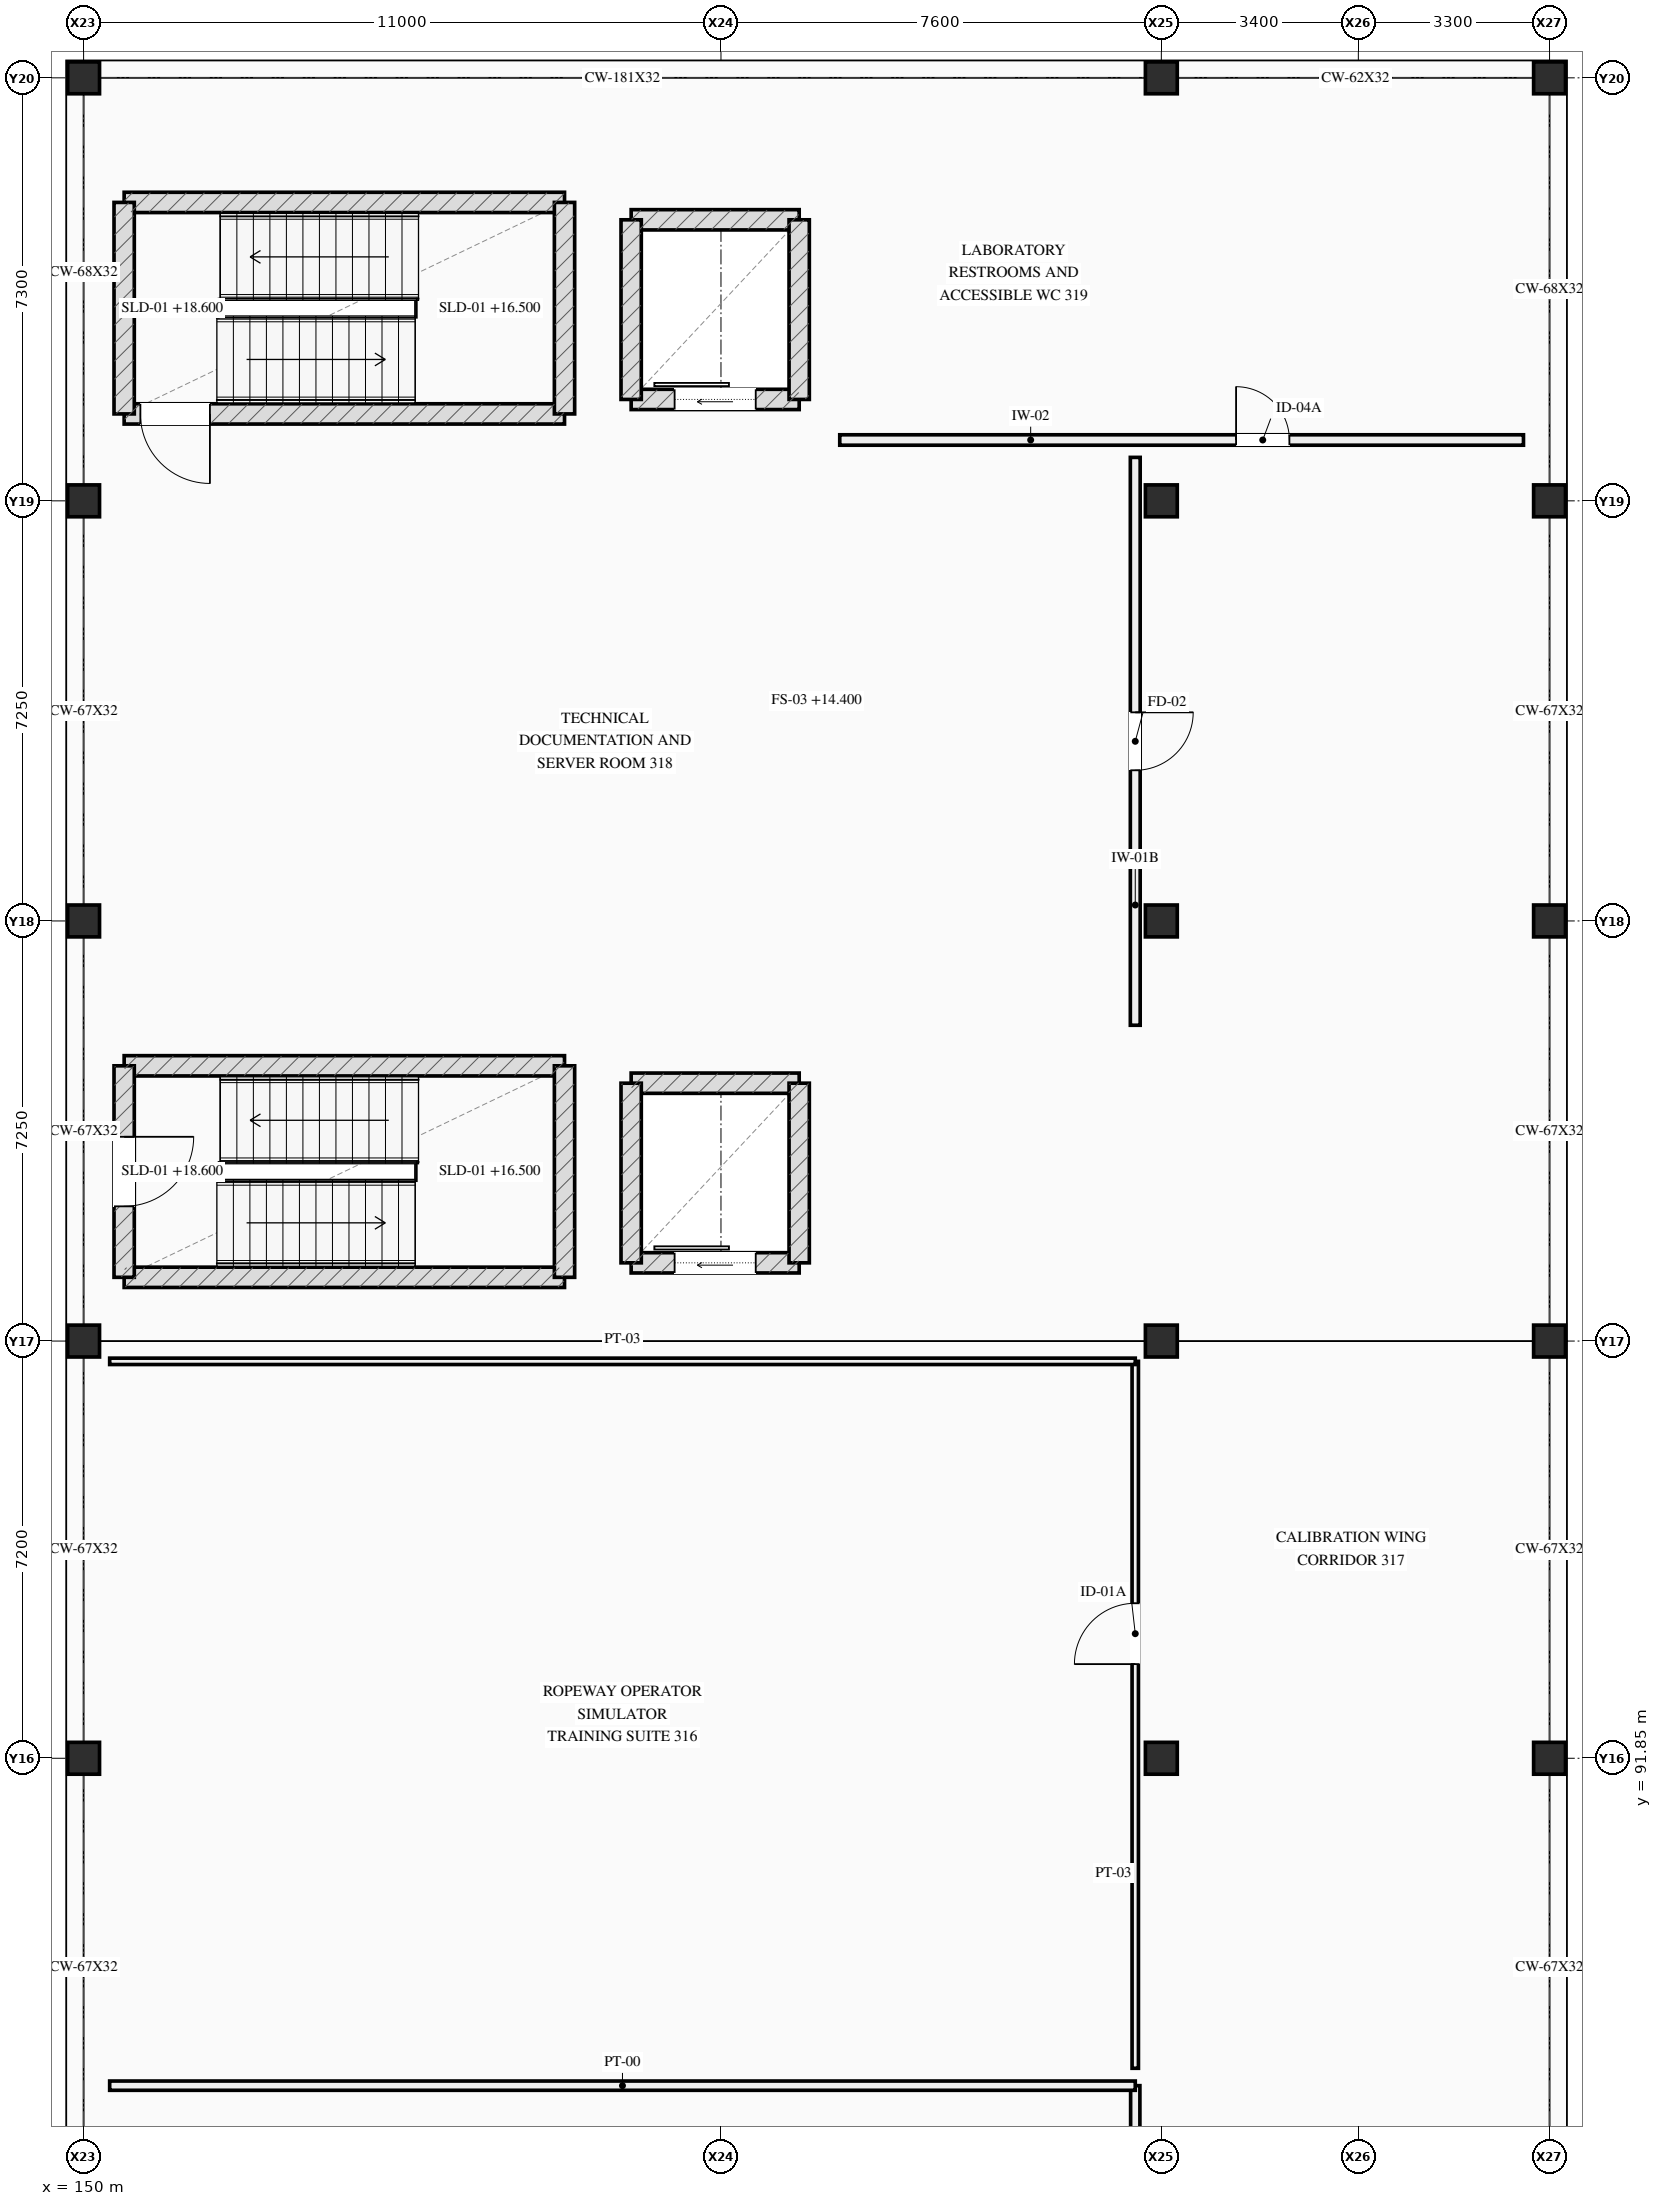
"""IFC4 building model, lengths in metres.
Left out: names, types, materials, properties, quantities, classifications, styles, units other than length and angle.
Written with IfcOpenShell. Run it as: python <this file> out.ifc"""

import sys

from ifc_helpers import new_model, si_unit, direction, frame, frame_2d, origin, origin_2d, place, context, subcontext, project, spatial, rectangle, extrude, element, fill, save


model = new_model("IFC4")
c1 = context("Model", 3, precision=1e-05, world=origin(), true_north=direction((0.0, 1.0)))
c2 = subcontext(c1, "Body", "Model", "MODEL_VIEW")
j1 = project(units=[si_unit("LENGTHUNIT", "METRE"), si_unit("PLANEANGLEUNIT", "RADIAN")], contexts=[c1])
p1 = place(None, origin())
s1 = spatial("IfcSite", under=j1, at=p1, CompositionType="ELEMENT")
p2 = place(p1, origin())
s2 = spatial("IfcBuilding", under=s1, at=p2, CompositionType="ELEMENT")
p3 = place(p2, frame((0.0, 0.0, 14.4)))
s3 = spatial("IfcBuildingStorey", under=s2, at=p3, CompositionType="ELEMENT", Elevation=14.4)
for number, where, z_axis, x_axis in (
    (1, (150.0, 91.85, 0.0), (0.0, 0.0, 1.0), (1.0, 0.0, 0.0)),
    (2, (150.0, 99.05, 0.0), (0.0, 0.0, 1.0), (1.0, 0.0, 0.0)),
    (3, (150.0, 106.3, 0.0), (0.0, 0.0, 1.0), (1.0, 0.0, 0.0)),
    (4, (150.0, 113.55, 0.0), (0.0, 0.0, 1.0), (1.0, 0.0, 0.0)),
    (5, (150.0, 120.85, 0.0), (0.0, 0.0, 1.0), (1.0, 0.0, 0.0)),
    (6, (168.6, 91.85, 0.0), (0.0, 0.0, 1.0), (1.0, 0.0, 0.0)),
    (7, (168.6, 99.05, 0.0), (0.0, 0.0, 1.0), (1.0, 0.0, 0.0)),
    (8, (168.6, 106.3, 0.0), (0.0, 0.0, 1.0), (1.0, 0.0, 0.0)),
    (9, (168.6, 113.55, 0.0), (0.0, 0.0, 1.0), (1.0, 0.0, 0.0)),
    (10, (168.6, 120.85, 0.0), (0.0, 0.0, 1.0), (1.0, 0.0, 0.0)),
    (11, (175.3, 91.85, 0.0), (0.0, 0.0, 1.0), (1.0, 0.0, 0.0)),
    (12, (175.3, 99.05, 0.0), (0.0, 0.0, 1.0), (1.0, 0.0, 0.0)),
    (13, (175.3, 106.3, 0.0), (0.0, 0.0, 1.0), (1.0, 0.0, 0.0)),
    (14, (175.3, 113.55, 0.0), (0.0, 0.0, 1.0), (1.0, 0.0, 0.0)),
    (15, (175.3, 120.85, 0.0), (0.0, 0.0, 1.0), (1.0, 0.0, 0.0)),
):
    element("IfcColumn", number, at=place(p3, frame(where, z_axis=z_axis, x_axis=x_axis)), inside=s3, PredefinedType="COLUMN", context=c2, shape_type="SweptSolid", body=[
        extrude(rectangle(XDim=0.55, YDim=0.55, at=origin_2d()), origin(), (0.0, 0.0, 1.0), 4.2),
    ])
for number, where, z_axis, x_axis in (
    (16, (150.7, 100.15, 0.0), (0.0, 0.0, 1.0), (1.0, 0.0, 0.0)),
    (17, (158.3, 103.8, 0.0), (0.0, 0.0, 1.0), (-1.0, 0.0, 0.0)),
):
    element("IfcWall", number, at=place(p3, frame(where, z_axis=z_axis, x_axis=x_axis)), inside=s3, PredefinedType="SHEAR", context=c2, shape_type="SweptSolid", body=[
        extrude(rectangle(XDim=7.6, YDim=0.35, at=frame_2d((3.8, 0.0))), origin(), (0.0, 0.0, 1.0), 3.99),
    ])
p4 = place(p3, frame((150.7, 103.8, 0.0), z_axis=(0.0, 0.0, 1.0), x_axis=(0.0, -1.0, 0.0)))
e18 = element("IfcWall", 18, at=p4, inside=s3, PredefinedType="SHEAR", context=c2, shape_type="SweptSolid", body=[
    extrude(rectangle(XDim=3.65, YDim=0.35, at=frame_2d((1.825, 0.0))), origin(), (0.0, 0.0, 1.0), 3.99),
])
p5 = place(p4, frame((1.225, 0.0, 0.0)))
e19 = element("IfcOpeningElement", 19, at=p5, cuts=e18, PredefinedType="OPENING", context=c2, shape_type="SweptSolid", body=[
    extrude(rectangle(XDim=1.2, YDim=2.2, at=frame_2d((0.6, 1.1))), frame((0.0, 0.185, 0.0), z_axis=(0.0, -1.0, 0.0), x_axis=(1.0, 0.0, 0.0)), (0.0, 0.0, 1.0), 0.37),
])
p6 = place(p3, frame((158.3, 100.15, 0.0), z_axis=(0.0, 0.0, 1.0), x_axis=(0.0, 1.0, 0.0)))
e20 = element("IfcWall", 20, at=p6, inside=s3, PredefinedType="SHEAR", context=c2, shape_type="SweptSolid", body=[
    extrude(rectangle(XDim=3.65, YDim=0.35, at=frame_2d((1.825, 0.0))), origin(), (0.0, 0.0, 1.0), 3.99),
])
p7 = place(p3, frame((159.45, 100.4, 0.0), z_axis=(0.0, 0.0, 1.0), x_axis=(1.0, 0.0, 0.0)))
e21 = element("IfcWall", 21, at=p7, inside=s3, PredefinedType="SHEAR", context=c2, shape_type="SweptSolid", body=[
    extrude(rectangle(XDim=2.9, YDim=0.35, at=frame_2d((1.45, 0.0))), origin(), (0.0, 0.0, 1.0), 3.99),
])
p8 = place(p7, frame((0.75, 0.0, 0.0)))
e22 = element("IfcOpeningElement", 22, at=p8, cuts=e21, PredefinedType="OPENING", context=c2, shape_type="SweptSolid", body=[
    extrude(rectangle(XDim=1.4, YDim=2.2, at=frame_2d((0.7, 1.1))), frame((0.0, 0.185, 0.0), z_axis=(0.0, -1.0, 0.0), x_axis=(1.0, 0.0, 0.0)), (0.0, 0.0, 1.0), 0.37),
])
p9 = place(p3, frame((159.45, 103.5, 0.0), z_axis=(0.0, 0.0, 1.0), x_axis=(1.0, 0.0, 0.0)))
e23 = element("IfcWall", 23, at=p9, inside=s3, PredefinedType="SHEAR", context=c2, shape_type="SweptSolid", body=[
    extrude(rectangle(XDim=2.9, YDim=0.35, at=frame_2d((1.45, 0.0))), origin(), (0.0, 0.0, 1.0), 3.99),
])
for number, where, z_axis, x_axis in (
    (24, (159.45, 100.4, 0.0), (0.0, 0.0, 1.0), (0.0, 1.0, 0.0)),
    (25, (162.35, 100.4, 0.0), (0.0, 0.0, 1.0), (0.0, 1.0, 0.0)),
):
    element("IfcWall", number, at=place(p3, frame(where, z_axis=z_axis, x_axis=x_axis)), inside=s3, PredefinedType="SHEAR", context=c2, shape_type="SweptSolid", body=[
        extrude(rectangle(XDim=3.1, YDim=0.35, at=frame_2d((1.55, 0.0))), origin(), (0.0, 0.0, 1.0), 3.99),
    ])
p10 = place(p3, frame((150.7, 115.05, 0.0), z_axis=(0.0, 0.0, 1.0), x_axis=(1.0, 0.0, 0.0)))
e26 = element("IfcWall", 26, at=p10, inside=s3, PredefinedType="SHEAR", context=c2, shape_type="SweptSolid", body=[
    extrude(rectangle(XDim=7.6, YDim=0.35, at=frame_2d((3.8, 0.0))), origin(), (0.0, 0.0, 1.0), 3.99),
])
p11 = place(p10, frame((0.28, 0.0, 0.0)))
e27 = element("IfcOpeningElement", 27, at=p11, cuts=e26, PredefinedType="OPENING", context=c2, shape_type="SweptSolid", body=[
    extrude(rectangle(XDim=1.2, YDim=2.2, at=frame_2d((0.6, 1.1))), frame((0.0, 0.185, 0.0), z_axis=(0.0, -1.0, 0.0), x_axis=(1.0, 0.0, 0.0)), (0.0, 0.0, 1.0), 0.37),
])
p12 = place(p3, frame((158.3, 118.7, 0.0), z_axis=(0.0, 0.0, 1.0), x_axis=(-1.0, 0.0, 0.0)))
e28 = element("IfcWall", 28, at=p12, inside=s3, PredefinedType="SHEAR", context=c2, shape_type="SweptSolid", body=[
    extrude(rectangle(XDim=7.6, YDim=0.35, at=frame_2d((3.8, 0.0))), origin(), (0.0, 0.0, 1.0), 3.99),
])
for number, where, z_axis, x_axis in (
    (29, (150.7, 118.7, 0.0), (0.0, 0.0, 1.0), (0.0, -1.0, 0.0)),
    (30, (158.3, 115.05, 0.0), (0.0, 0.0, 1.0), (0.0, 1.0, 0.0)),
):
    element("IfcWall", number, at=place(p3, frame(where, z_axis=z_axis, x_axis=x_axis)), inside=s3, PredefinedType="SHEAR", context=c2, shape_type="SweptSolid", body=[
        extrude(rectangle(XDim=3.65, YDim=0.35, at=frame_2d((1.825, 0.0))), origin(), (0.0, 0.0, 1.0), 3.99),
    ])
p13 = place(p3, frame((159.45, 115.3, 0.0), z_axis=(0.0, 0.0, 1.0), x_axis=(1.0, 0.0, 0.0)))
e31 = element("IfcWall", 31, at=p13, inside=s3, PredefinedType="SHEAR", context=c2, shape_type="SweptSolid", body=[
    extrude(rectangle(XDim=2.9, YDim=0.35, at=frame_2d((1.45, 0.0))), origin(), (0.0, 0.0, 1.0), 3.99),
])
p14 = place(p13, frame((0.75, 0.0, 0.0)))
e32 = element("IfcOpeningElement", 32, at=p14, cuts=e31, PredefinedType="OPENING", context=c2, shape_type="SweptSolid", body=[
    extrude(rectangle(XDim=1.4, YDim=2.2, at=frame_2d((0.7, 1.1))), frame((0.0, 0.185, 0.0), z_axis=(0.0, -1.0, 0.0), x_axis=(1.0, 0.0, 0.0)), (0.0, 0.0, 1.0), 0.37),
])
p15 = place(p3, frame((159.45, 118.4, 0.0), z_axis=(0.0, 0.0, 1.0), x_axis=(1.0, 0.0, 0.0)))
e33 = element("IfcWall", 33, at=p15, inside=s3, PredefinedType="SHEAR", context=c2, shape_type="SweptSolid", body=[
    extrude(rectangle(XDim=2.9, YDim=0.35, at=frame_2d((1.45, 0.0))), origin(), (0.0, 0.0, 1.0), 3.99),
])
for number, where, z_axis, x_axis in (
    (34, (159.45, 115.3, 0.0), (0.0, 0.0, 1.0), (0.0, 1.0, 0.0)),
    (35, (162.35, 115.3, 0.0), (0.0, 0.0, 1.0), (0.0, 1.0, 0.0)),
):
    element("IfcWall", number, at=place(p3, frame(where, z_axis=z_axis, x_axis=x_axis)), inside=s3, PredefinedType="SHEAR", context=c2, shape_type="SweptSolid", body=[
        extrude(rectangle(XDim=3.1, YDim=0.35, at=frame_2d((1.55, 0.0))), origin(), (0.0, 0.0, 1.0), 3.99),
    ])
p16 = place(p3, frame((168.15, 70.75, 0.0), z_axis=(0.0, 0.0, 1.0), x_axis=(0.0, 1.0, 0.0)))
e36 = element("IfcWall", 36, at=p16, inside=s3, PredefinedType="PARTITIONING", context=c2, shape_type="SweptSolid", body=[
    extrude(rectangle(XDim=15.45, YDim=0.16, at=frame_2d((7.725, 0.0))), origin(), (0.0, 0.0, 1.0), 3.05),
])
p17 = place(p16, frame((8.25, 0.0, 0.0)))
e37 = element("IfcOpeningElement", 37, at=p17, cuts=e36, PredefinedType="OPENING", context=c2, shape_type="SweptSolid", body=[
    extrude(rectangle(XDim=1.05, YDim=2.2, at=frame_2d((0.525, 1.1))), frame((0.0, 0.09, 0.0), z_axis=(0.0, -1.0, 0.0), x_axis=(1.0, 0.0, 0.0)), (0.0, 0.0, 1.0), 0.18),
])
p18 = place(p3, frame((150.45, 86.2, 0.0), z_axis=(0.0, 0.0, 1.0), x_axis=(1.0, 0.0, 0.0)))
e38 = element("IfcWall", 38, at=p18, inside=s3, PredefinedType="PARTITIONING", context=c2, shape_type="SweptSolid", body=[
    extrude(rectangle(XDim=17.7, YDim=0.16, at=frame_2d((8.85, 0.0))), origin(), (0.0, 0.0, 1.0), 3.05),
])
p19 = place(p3, frame((168.15, 86.5, 0.0), z_axis=(0.0, 0.0, 1.0), x_axis=(0.0, 1.0, 0.0)))
e39 = element("IfcWall", 39, at=p19, inside=s3, PredefinedType="MOVABLE", context=c2, shape_type="SweptSolid", body=[
    extrude(rectangle(XDim=12.2, YDim=0.11, at=frame_2d((6.1, 0.0))), origin(), (0.0, 0.0, 1.0), 3.05),
])
p20 = place(p19, frame((6.975, 0.0, 0.0)))
e40 = element("IfcOpeningElement", 40, at=p20, cuts=e39, PredefinedType="OPENING", context=c2, shape_type="SweptSolid", body=[
    extrude(rectangle(XDim=1.05, YDim=2.2, at=frame_2d((0.525, 1.1))), frame((0.0, 0.065, 0.0), z_axis=(0.0, -1.0, 0.0), x_axis=(1.0, 0.0, 0.0)), (0.0, 0.0, 1.0), 0.13),
])
p21 = place(p3, frame((150.45, 98.7, 0.0), z_axis=(0.0, 0.0, 1.0), x_axis=(1.0, 0.0, 0.0)))
e41 = element("IfcWall", 41, at=p21, inside=s3, PredefinedType="MOVABLE", context=c2, shape_type="SweptSolid", body=[
    extrude(rectangle(XDim=17.7, YDim=0.11, at=frame_2d((8.85, 0.0))), origin(), (0.0, 0.0, 1.0), 3.05),
])
p22 = place(p3, frame((168.15, 104.5, 0.0), z_axis=(0.0, 0.0, 1.0), x_axis=(0.0, 1.0, 0.0)))
e42 = element("IfcWall", 42, at=p22, inside=s3, PredefinedType="SOLIDWALL", context=c2, shape_type="SweptSolid", body=[
    extrude(rectangle(XDim=9.8, YDim=0.17, at=frame_2d((4.9, 0.0))), origin(), (0.0, 0.0, 1.0), 3.05),
])
p23 = place(p22, frame((4.4, 0.0, 0.0)))
e43 = element("IfcOpeningElement", 43, at=p23, cuts=e42, PredefinedType="OPENING", context=c2, shape_type="SweptSolid", body=[
    extrude(rectangle(XDim=1.0, YDim=2.15, at=frame_2d((0.5, 1.075))), frame((0.0, 0.095, 0.0), z_axis=(0.0, -1.0, 0.0), x_axis=(1.0, 0.0, 0.0)), (0.0, 0.0, 1.0), 0.19),
])
p24 = place(p3, frame((163.05, 114.6, 0.0), z_axis=(0.0, 0.0, 1.0), x_axis=(1.0, 0.0, 0.0)))
e44 = element("IfcWall", 44, at=p24, inside=s3, PredefinedType="PLUMBINGWALL", context=c2, shape_type="SweptSolid", body=[
    extrude(rectangle(XDim=11.8, YDim=0.18, at=frame_2d((5.9, 0.0))), origin(), (0.0, 0.0, 1.0), 3.05),
])
p25 = place(p24, frame((6.84, 0.0, 0.0)))
e45 = element("IfcOpeningElement", 45, at=p25, cuts=e44, PredefinedType="OPENING", context=c2, shape_type="SweptSolid", body=[
    extrude(rectangle(XDim=0.92, YDim=2.1, at=frame_2d((0.46, 1.05))), frame((0.0, 0.1, 0.0), z_axis=(0.0, -1.0, 0.0), x_axis=(1.0, 0.0, 0.0)), (0.0, 0.0, 1.0), 0.2),
])
p26 = place(p5, origin())
e46 = element("IfcDoor", 46, at=p26, inside=s3, OperationType="SINGLE_SWING_LEFT", PredefinedType="DOOR", context=c2, shape_type="SweptSolid", body=[
    extrude(rectangle(XDim=1.2, YDim=2.2, at=frame_2d((0.6, 1.1))), frame((0.0, 0.025, 0.0), z_axis=(0.0, -1.0, 0.0), x_axis=(1.0, 0.0, 0.0)), (0.0, 0.0, 1.0), 0.05),
])
fill(e19, e46)
p27 = place(p8, origin())
e47 = element("IfcDoor", 47, at=p27, inside=s3, OperationType="SLIDING_TO_LEFT", PredefinedType="DOOR", context=c2, shape_type="SweptSolid", body=[
    extrude(rectangle(XDim=1.4, YDim=2.2, at=frame_2d((0.7, 1.1))), frame((0.0, 0.025, 0.0), z_axis=(0.0, -1.0, 0.0), x_axis=(1.0, 0.0, 0.0)), (0.0, 0.0, 1.0), 0.05),
])
fill(e22, e47)
p28 = place(p11, origin())
e48 = element("IfcDoor", 48, at=p28, inside=s3, OperationType="SINGLE_SWING_RIGHT", PredefinedType="DOOR", context=c2, shape_type="SweptSolid", body=[
    extrude(rectangle(XDim=1.2, YDim=2.2, at=frame_2d((0.6, 1.1))), frame((0.0, 0.025, 0.0), z_axis=(0.0, -1.0, 0.0), x_axis=(1.0, 0.0, 0.0)), (0.0, 0.0, 1.0), 0.05),
])
fill(e27, e48)
p29 = place(p14, origin())
e49 = element("IfcDoor", 49, at=p29, inside=s3, OperationType="SLIDING_TO_LEFT", PredefinedType="DOOR", context=c2, shape_type="SweptSolid", body=[
    extrude(rectangle(XDim=1.4, YDim=2.2, at=frame_2d((0.7, 1.1))), frame((0.0, 0.025, 0.0), z_axis=(0.0, -1.0, 0.0), x_axis=(1.0, 0.0, 0.0)), (0.0, 0.0, 1.0), 0.05),
])
fill(e32, e49)
p30 = place(p20, origin())
e50 = element("IfcDoor", 50, at=p30, inside=s3, OperationType="SINGLE_SWING_LEFT", PredefinedType="DOOR", context=c2, shape_type="SweptSolid", body=[
    extrude(rectangle(XDim=1.05, YDim=2.2, at=frame_2d((0.525, 1.1))), frame((0.0, 0.025, 0.0), z_axis=(0.0, -1.0, 0.0), x_axis=(1.0, 0.0, 0.0)), (0.0, 0.0, 1.0), 0.05),
])
fill(e40, e50)
p31 = place(p23, origin())
e51 = element("IfcDoor", 51, at=p31, inside=s3, OperationType="SINGLE_SWING_RIGHT", PredefinedType="DOOR", context=c2, shape_type="SweptSolid", body=[
    extrude(rectangle(XDim=1.0, YDim=2.15, at=frame_2d((0.5, 1.075))), frame((0.0, 0.025, 0.0), z_axis=(0.0, -1.0, 0.0), x_axis=(1.0, 0.0, 0.0)), (0.0, 0.0, 1.0), 0.05),
])
fill(e43, e51)
p32 = place(p25, origin())
e52 = element("IfcDoor", 52, at=p32, inside=s3, OperationType="SINGLE_SWING_LEFT", PredefinedType="DOOR", context=c2, shape_type="SweptSolid", body=[
    extrude(rectangle(XDim=0.92, YDim=2.1, at=frame_2d((0.46, 1.05))), frame((0.0, 0.025, 0.0), z_axis=(0.0, -1.0, 0.0), x_axis=(1.0, 0.0, 0.0)), (0.0, 0.0, 1.0), 0.05),
])
fill(e45, e52)
save(model, sys.argv[1])
